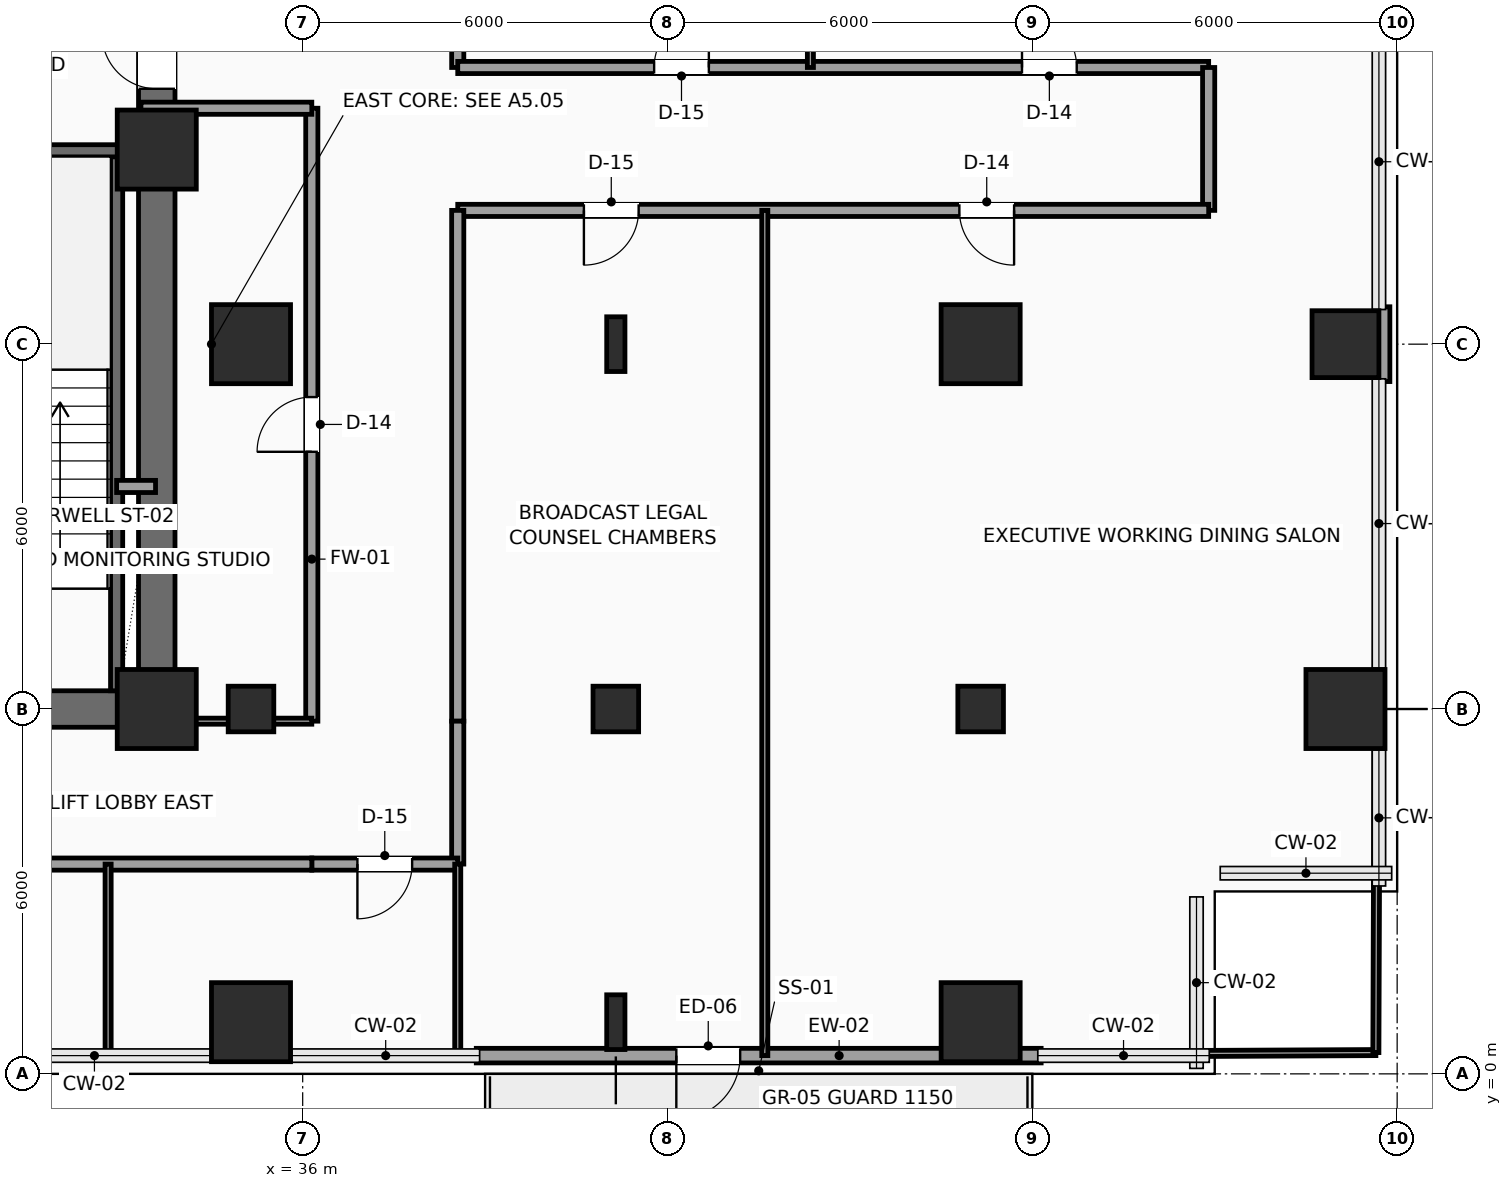
"""IFC4 building model, lengths in metres.
Left out: names, types, materials, properties, quantities, classifications, styles, units other than length and angle.
Written with IfcOpenShell. Run it as: python <this file> out.ifc"""

import sys

from ifc_helpers import new_model, si_unit, direction, frame, frame_2d, origin, origin_2d, place, context, subcontext, project, spatial, rectangle, hollow_rectangle, i_section, extrude, element, fill, save


model = new_model("IFC4")
c1 = context("Model", 3, precision=1e-05, world=origin(), true_north=direction((0.0, 1.0)))
c2 = subcontext(c1, "Body", "Model", "MODEL_VIEW")
j1 = project(units=[si_unit("LENGTHUNIT", "METRE"), si_unit("PLANEANGLEUNIT", "RADIAN")], contexts=[c1])
p1 = place(None, origin())
s1 = spatial("IfcSite", under=j1, at=p1, CompositionType="ELEMENT")
p2 = place(p1, origin())
s2 = spatial("IfcBuilding", under=s1, at=p2, CompositionType="ELEMENT")
p3 = place(p2, frame((0.0, 0.0, 87.0)))
s3 = spatial("IfcBuildingStorey", under=s2, at=p3, CompositionType="ELEMENT", Elevation=87.0)
for number, where, z_axis, x_axis in (
    (1, (33.6, 6.0, 0.0), (0.0, 0.0, 1.0), (1.0, 0.0, 0.0)),
    (2, (33.6, 15.2, 0.0), (0.0, 0.0, 1.0), (1.0, 0.0, 0.0)),
    (3, (35.15, 0.85, 0.0), (0.0, 0.0, 1.0), (1.0, 0.0, 0.0)),
):
    element("IfcColumn", number, at=place(p3, frame(where, z_axis=z_axis, x_axis=x_axis)), inside=s3, PredefinedType="COLUMN", context=c2, shape_type="SweptSolid", body=[
        extrude(rectangle(XDim=1.3, YDim=1.3, at=origin_2d()), origin(), (0.0, 0.0, 1.0), 3.9),
    ])
p4 = place(p3, frame((35.15, 6.0, 0.0), z_axis=(0.0, 0.0, 1.0), x_axis=(1.0, 0.0, 0.0)))
e4 = element("IfcColumn", 4, at=p4, inside=s3, PredefinedType="COLUMN", context=c2, shape_type="SweptSolid", body=[
    extrude(hollow_rectangle(XDim=0.75, YDim=0.75, WallThickness=0.035, InnerFilletRadius=0.035, OuterFilletRadius=0.05, at=origin_2d()), origin(), (0.0, 0.0, 1.0), 3.9),
])
p5 = place(p3, frame((35.15, 12.0, 0.0), z_axis=(0.0, 0.0, 1.0), x_axis=(1.0, 0.0, 0.0)))
e5 = element("IfcColumn", 5, at=p5, inside=s3, PredefinedType="COLUMN", context=c2, shape_type="SweptSolid", body=[
    extrude(rectangle(XDim=1.3, YDim=1.3, at=origin_2d()), origin(), (0.0, 0.0, 1.0), 3.9),
])
p6 = place(p3, frame((41.15, 0.85, 0.0), z_axis=(0.0, 0.0, 1.0), x_axis=(1.0, 0.0, 0.0)))
e6 = element("IfcColumn", 6, at=p6, inside=s3, PredefinedType="COLUMN", context=c2, shape_type="SweptSolid", body=[
    extrude(i_section(OverallWidth=0.3, OverallDepth=0.9, WebThickness=0.019, FlangeThickness=0.035, FilletRadius=0.03, at=origin_2d()), origin(), (0.0, 0.0, 1.0), 3.9),
])
p7 = place(p3, frame((41.15, 6.0, 0.0), z_axis=(0.0, 0.0, 1.0), x_axis=(1.0, 0.0, 0.0)))
e7 = element("IfcColumn", 7, at=p7, inside=s3, PredefinedType="COLUMN", context=c2, shape_type="SweptSolid", body=[
    extrude(hollow_rectangle(XDim=0.75, YDim=0.75, WallThickness=0.035, InnerFilletRadius=0.035, OuterFilletRadius=0.05, at=origin_2d()), origin(), (0.0, 0.0, 1.0), 3.9),
])
p8 = place(p3, frame((41.15, 12.0, 0.0), z_axis=(0.0, 0.0, 1.0), x_axis=(1.0, 0.0, 0.0)))
e8 = element("IfcColumn", 8, at=p8, inside=s3, PredefinedType="COLUMN", context=c2, shape_type="SweptSolid", body=[
    extrude(i_section(OverallWidth=0.3, OverallDepth=0.9, WebThickness=0.019, FlangeThickness=0.035, FilletRadius=0.03, at=origin_2d()), origin(), (0.0, 0.0, 1.0), 3.9),
])
p9 = place(p3, frame((47.15, 0.85, 0.0), z_axis=(0.0, 0.0, 1.0), x_axis=(1.0, 0.0, 0.0)))
e9 = element("IfcColumn", 9, at=p9, inside=s3, PredefinedType="COLUMN", context=c2, shape_type="SweptSolid", body=[
    extrude(rectangle(XDim=1.3, YDim=1.3, at=origin_2d()), origin(), (0.0, 0.0, 1.0), 3.9),
])
p10 = place(p3, frame((47.15, 6.0, 0.0), z_axis=(0.0, 0.0, 1.0), x_axis=(1.0, 0.0, 0.0)))
e10 = element("IfcColumn", 10, at=p10, inside=s3, PredefinedType="COLUMN", context=c2, shape_type="SweptSolid", body=[
    extrude(hollow_rectangle(XDim=0.75, YDim=0.75, WallThickness=0.035, InnerFilletRadius=0.035, OuterFilletRadius=0.05, at=origin_2d()), origin(), (0.0, 0.0, 1.0), 3.9),
])
for number, where, z_axis, x_axis in (
    (11, (47.15, 12.0, 0.0), (0.0, 0.0, 1.0), (1.0, 0.0, 0.0)),
    (12, (53.15, 6.0, 0.0), (0.0, 0.0, 1.0), (1.0, 0.0, 0.0)),
):
    element("IfcColumn", number, at=place(p3, frame(where, z_axis=z_axis, x_axis=x_axis)), inside=s3, PredefinedType="COLUMN", context=c2, shape_type="SweptSolid", body=[
        extrude(rectangle(XDim=1.3, YDim=1.3, at=origin_2d()), origin(), (0.0, 0.0, 1.0), 3.9),
    ])
p11 = place(p3, frame((53.15, 12.0, 0.0), z_axis=(0.0, 0.0, 1.0), x_axis=(1.0, 0.0, 0.0)))
e13 = element("IfcColumn", 13, at=p11, inside=s3, PredefinedType="COLUMN", context=c2, shape_type="SweptSolid", body=[
    extrude(rectangle(XDim=1.1, YDim=1.1, at=origin_2d()), origin(), (0.0, 0.0, 1.0), 3.9),
])
p12 = place(p3, frame((48.145, 0.3, 0.0), z_axis=(0.0, 0.0, 1.0), x_axis=(-1.0, 0.0, 0.0)))
e14 = element("IfcWall", 14, at=p12, inside=s3, PredefinedType="SOLIDWALL", context=c2, shape_type="SweptSolid", body=[
    extrude(rectangle(XDim=9.29, YDim=0.24, at=frame_2d((4.645, 0.0))), origin(), (0.0, 0.0, 1.0), 3.65),
])
p13 = place(p12, frame((4.95, 0.0, 0.0)))
e15 = element("IfcOpeningElement", 15, at=p13, cuts=e14, PredefinedType="OPENING", context=c2, shape_type="SweptSolid", body=[
    extrude(rectangle(XDim=1.05, YDim=2.2, at=frame_2d((0.525, 1.1))), frame((0.0, 0.13, 0.0), z_axis=(0.0, -1.0, 0.0), x_axis=(1.0, 0.0, 0.0)), (0.0, 0.0, 1.0), 0.26),
])
p14 = place(p3, frame((53.76, 12.615, 0.0), z_axis=(0.0, 0.0, 1.0), x_axis=(0.0, -1.0, 0.0)))
e16 = element("IfcWall", 16, at=p14, inside=s3, PredefinedType="SOLIDWALL", context=c2, shape_type="SweptSolid", body=[
    extrude(rectangle(XDim=1.23, YDim=0.24, at=frame_2d((0.615, 0.0))), origin(), (0.0, 0.0, 1.0), 3.65),
])
p15 = place(p3, frame((24.0, 6.0, 0.0), z_axis=(0.0, 0.0, 1.0), x_axis=(1.0, 0.0, 0.0)))
e17 = element("IfcWall", 17, at=p15, inside=s3, PredefinedType="SHEAR", context=c2, shape_type="SweptSolid", body=[
    extrude(rectangle(XDim=9.6, YDim=0.6, at=frame_2d((4.8, 0.0))), origin(), (0.0, 0.0, 1.0), 3.65),
])
p16 = place(p3, frame((33.6, 6.0, 0.0), z_axis=(0.0, 0.0, 1.0), x_axis=(0.0, 1.0, 0.0)))
e18 = element("IfcWall", 18, at=p16, inside=s3, PredefinedType="SHEAR", context=c2, shape_type="SweptSolid", body=[
    extrude(rectangle(XDim=12.0, YDim=0.6, at=frame_2d((6.0, 0.0))), origin(), (0.0, 0.0, 1.0), 3.65),
])
p17 = place(p16, frame((10.2, 0.0, 0.0)))
e19 = element("IfcOpeningElement", 19, at=p17, cuts=e18, PredefinedType="OPENING", context=c2, shape_type="SweptSolid", body=[
    extrude(rectangle(XDim=0.9, YDim=2.15, at=frame_2d((0.45, 1.075))), frame((0.0, 0.31, 0.0), z_axis=(0.0, -1.0, 0.0), x_axis=(1.0, 0.0, 0.0)), (0.0, 0.0, 1.0), 0.62),
])
p18 = place(p3, frame((32.94, 6.3, 0.0), z_axis=(0.0, 0.0, 1.0), x_axis=(0.0, 1.0, 0.0)))
e20 = element("IfcWall", 20, at=p18, inside=s3, PredefinedType="SHEAR", context=c2, shape_type="SweptSolid", body=[
    extrude(rectangle(XDim=8.88, YDim=0.2, at=frame_2d((4.44, 0.0))), origin(), (0.0, 0.0, 1.0), 3.65),
])
p19 = place(p3, frame((29.26, 15.18, 0.0), z_axis=(0.0, 0.0, 1.0), x_axis=(1.0, 0.0, 0.0)))
e21 = element("IfcWall", 21, at=p19, inside=s3, PredefinedType="SHEAR", context=c2, shape_type="SweptSolid", body=[
    extrude(rectangle(XDim=4.04, YDim=0.2, at=frame_2d((2.02, 0.0))), origin(), (0.0, 0.0, 1.0), 3.65),
])
p20 = place(p3, frame((32.94, 9.66, 0.0), z_axis=(0.0, 0.0, 1.0), x_axis=(1.0, 0.0, 0.0)))
e22 = element("IfcWall", 22, at=p20, inside=s3, PredefinedType="SOLIDWALL", context=c2, shape_type="SweptSolid", body=[
    extrude(rectangle(XDim=0.64, YDim=0.2, at=frame_2d((0.32, 0.0))), origin(), (0.0, 0.0, 1.0), 3.65),
])
p21 = place(p3, frame((36.15, 5.8, 0.0), z_axis=(0.0, 0.0, 1.0), x_axis=(0.0, 1.0, 0.0)))
e23 = element("IfcWall", 23, at=p21, inside=s3, PredefinedType="SOLIDWALL", context=c2, shape_type="SweptSolid", body=[
    extrude(rectangle(XDim=10.08, YDim=0.2, at=frame_2d((5.04, 0.0))), origin(), (0.0, 0.0, 1.0), 3.65),
])
p22 = place(p21, frame((4.43, 0.0, 0.0)))
e24 = element("IfcOpeningElement", 24, at=p22, cuts=e23, PredefinedType="OPENING", context=c2, shape_type="SweptSolid", body=[
    extrude(rectangle(XDim=0.9, YDim=2.1, at=frame_2d((0.45, 1.05))), frame((0.0, 0.11, 0.0), z_axis=(0.0, -1.0, 0.0), x_axis=(1.0, 0.0, 0.0)), (0.0, 0.0, 1.0), 0.22),
])
p23 = place(p3, frame((36.15, 15.88, 0.0), z_axis=(0.0, 0.0, 1.0), x_axis=(-1.0, 0.0, 0.0)))
e25 = element("IfcWall", 25, at=p23, inside=s3, PredefinedType="SOLIDWALL", context=c2, shape_type="SweptSolid", body=[
    extrude(rectangle(XDim=2.81, YDim=0.2, at=frame_2d((1.405, 0.0))), origin(), (0.0, 0.0, 1.0), 3.65),
])
p24 = place(p3, frame((38.55, 23.7, 0.0), z_axis=(0.0, 0.0, 1.0), x_axis=(0.0, -1.0, 0.0)))
e26 = element("IfcWall", 26, at=p24, inside=s3, PredefinedType="SOLIDWALL", context=c2, shape_type="SweptSolid", body=[
    extrude(rectangle(XDim=7.15, YDim=0.2, at=frame_2d((3.575, 0.0))), origin(), (0.0, 0.0, 1.0), 3.65),
])
p25 = place(p3, frame((38.55, 16.55, 0.0), z_axis=(0.0, 0.0, 1.0), x_axis=(1.0, 0.0, 0.0)))
e27 = element("IfcWall", 27, at=p25, inside=s3, PredefinedType="SOLIDWALL", context=c2, shape_type="SweptSolid", body=[
    extrude(rectangle(XDim=12.35, YDim=0.2, at=frame_2d((6.175, 0.0))), origin(), (0.0, 0.0, 1.0), 3.65),
])
p26 = place(p25, frame((3.23, 0.0, 0.0)))
e28 = element("IfcOpeningElement", 28, at=p26, cuts=e27, PredefinedType="OPENING", context=c2, shape_type="SweptSolid", body=[
    extrude(rectangle(XDim=0.9, YDim=2.1, at=frame_2d((0.45, 1.05))), frame((0.0, 0.11, 0.0), z_axis=(0.0, -1.0, 0.0), x_axis=(1.0, 0.0, 0.0)), (0.0, 0.0, 1.0), 0.22),
])
p27 = place(p25, frame((9.28, 0.0, 0.0)))
e29 = element("IfcOpeningElement", 29, at=p27, cuts=e27, PredefinedType="OPENING", context=c2, shape_type="SweptSolid", body=[
    extrude(rectangle(XDim=0.9, YDim=2.1, at=frame_2d((0.45, 1.05))), frame((0.0, 0.11, 0.0), z_axis=(0.0, -1.0, 0.0), x_axis=(1.0, 0.0, 0.0)), (0.0, 0.0, 1.0), 0.22),
])
p28 = place(p3, frame((50.9, 16.55, 0.0), z_axis=(0.0, 0.0, 1.0), x_axis=(0.0, -1.0, 0.0)))
e30 = element("IfcWall", 30, at=p28, inside=s3, PredefinedType="SOLIDWALL", context=c2, shape_type="SweptSolid", body=[
    extrude(rectangle(XDim=2.35, YDim=0.2, at=frame_2d((1.175, 0.0))), origin(), (0.0, 0.0, 1.0), 3.65),
])
p29 = place(p3, frame((50.9, 14.2, 0.0), z_axis=(0.0, 0.0, 1.0), x_axis=(-1.0, 0.0, 0.0)))
e31 = element("IfcWall", 31, at=p29, inside=s3, PredefinedType="SOLIDWALL", context=c2, shape_type="SweptSolid", body=[
    extrude(rectangle(XDim=12.35, YDim=0.2, at=frame_2d((6.175, 0.0))), origin(), (0.0, 0.0, 1.0), 3.65),
])
p30 = place(p29, frame((9.375, 0.0, 0.0)))
e32 = element("IfcOpeningElement", 32, at=p30, cuts=e31, PredefinedType="OPENING", context=c2, shape_type="SweptSolid", body=[
    extrude(rectangle(XDim=0.9, YDim=2.1, at=frame_2d((0.45, 1.05))), frame((0.0, 0.11, 0.0), z_axis=(0.0, -1.0, 0.0), x_axis=(1.0, 0.0, 0.0)), (0.0, 0.0, 1.0), 0.22),
])
p31 = place(p29, frame((3.2, 0.0, 0.0)))
e33 = element("IfcOpeningElement", 33, at=p31, cuts=e31, PredefinedType="OPENING", context=c2, shape_type="SweptSolid", body=[
    extrude(rectangle(XDim=0.9, YDim=2.1, at=frame_2d((0.45, 1.05))), frame((0.0, 0.11, 0.0), z_axis=(0.0, -1.0, 0.0), x_axis=(1.0, 0.0, 0.0)), (0.0, 0.0, 1.0), 0.22),
])
p32 = place(p3, frame((38.55, 14.2, 0.0), z_axis=(0.0, 0.0, 1.0), x_axis=(0.0, -1.0, 0.0)))
e34 = element("IfcWall", 34, at=p32, inside=s3, PredefinedType="SOLIDWALL", context=c2, shape_type="SweptSolid", body=[
    extrude(rectangle(XDim=8.4, YDim=0.2, at=frame_2d((4.2, 0.0))), origin(), (0.0, 0.0, 1.0), 3.65),
])
p33 = place(p3, frame((38.55, 5.8, 0.0), z_axis=(0.0, 0.0, 1.0), x_axis=(0.0, -1.0, 0.0)))
e35 = element("IfcWall", 35, at=p33, inside=s3, PredefinedType="SOLIDWALL", context=c2, shape_type="SweptSolid", body=[
    extrude(rectangle(XDim=2.35, YDim=0.2, at=frame_2d((1.175, 0.0))), origin(), (0.0, 0.0, 1.0), 3.65),
])
p34 = place(p3, frame((38.55, 3.45, 0.0), z_axis=(0.0, 0.0, 1.0), x_axis=(-1.0, 0.0, 0.0)))
e36 = element("IfcWall", 36, at=p34, inside=s3, PredefinedType="SOLIDWALL", context=c2, shape_type="SweptSolid", body=[
    extrude(rectangle(XDim=2.4, YDim=0.2, at=frame_2d((1.2, 0.0))), origin(), (0.0, 0.0, 1.0), 3.142),
])
p35 = place(p34, frame((0.75, 0.0, 0.0)))
e37 = element("IfcOpeningElement", 37, at=p35, cuts=e36, PredefinedType="OPENING", context=c2, shape_type="SweptSolid", body=[
    extrude(rectangle(XDim=0.9, YDim=2.1, at=frame_2d((0.45, 1.05))), frame((0.0, 0.11, 0.0), z_axis=(0.0, -1.0, 0.0), x_axis=(1.0, 0.0, 0.0)), (0.0, 0.0, 1.0), 0.22),
])
p36 = place(p3, frame((36.15, 3.45, 0.0), z_axis=(0.0, 0.0, 1.0), x_axis=(-1.0, 0.0, 0.0)))
e38 = element("IfcWall", 38, at=p36, inside=s3, PredefinedType="SOLIDWALL", context=c2, shape_type="SweptSolid", body=[
    extrude(rectangle(XDim=14.6, YDim=0.2, at=frame_2d((7.3, 0.0))), origin(), (0.0, 0.0, 1.0), 3.142),
])
p37 = place(p36, frame((11.325, 0.0, 0.0)))
e39 = element("IfcOpeningElement", 39, at=p37, cuts=e38, PredefinedType="OPENING", context=c2, shape_type="SweptSolid", body=[
    extrude(rectangle(XDim=0.9, YDim=2.1, at=frame_2d((0.45, 1.05))), frame((0.0, 0.11, 0.0), z_axis=(0.0, -1.0, 0.0), x_axis=(1.0, 0.0, 0.0)), (0.0, 0.0, 1.0), 0.22),
])
p38 = place(p36, frame((5.7, 0.0, 0.0)))
e40 = element("IfcOpeningElement", 40, at=p38, cuts=e38, PredefinedType="OPENING", context=c2, shape_type="SweptSolid", body=[
    extrude(rectangle(XDim=0.9, YDim=2.1, at=frame_2d((0.45, 1.05))), frame((0.0, 0.11, 0.0), z_axis=(0.0, -1.0, 0.0), x_axis=(1.0, 0.0, 0.0)), (0.0, 0.0, 1.0), 0.22),
])
p39 = place(p3, frame((43.6, 0.3, 0.0), z_axis=(0.0, 0.0, 1.0), x_axis=(0.0, 1.0, 0.0)))
e41 = element("IfcWall", 41, at=p39, inside=s3, PredefinedType="PARTITIONING", context=c2, shape_type="SweptSolid", body=[
    extrude(rectangle(XDim=13.9, YDim=0.1, at=frame_2d((6.95, 0.0))), origin(), (0.0, 0.0, 1.0), 3.65),
])
p40 = place(p3, frame((48.145, 0.323, 0.0), z_axis=(0.0, 0.0, 1.0), x_axis=(0.999987442515, 0.005011468024, 0.0)))
e42 = element("IfcWall", 42, at=p40, inside=s3, PredefinedType="PARTITIONING", context=c2, shape_type="SweptSolid", body=[
    extrude(rectangle(XDim=5.505, YDim=0.1, at=frame_2d((2.752, 0.0))), origin(), (0.0, 0.0, 1.0), 3.65),
])
p41 = place(p3, frame((53.65, 0.35, 0.0), z_axis=(0.0, 0.0, 1.0), x_axis=(0.003606251025, 0.999993497456, 0.0)))
e43 = element("IfcWall", 43, at=p41, inside=s3, PredefinedType="PARTITIONING", context=c2, shape_type="SweptSolid", body=[
    extrude(rectangle(XDim=11.035, YDim=0.1, at=frame_2d((5.518, 0.0))), origin(), (0.0, 0.0, 1.0), 3.65),
])
p42 = place(p3, frame((53.694, 12.615, 0.0), z_axis=(0.0, 0.0, 1.0), x_axis=(0.003542799701, 0.999993724265, 0.0)))
e44 = element("IfcWall", 44, at=p42, inside=s3, PredefinedType="PARTITIONING", context=c2, shape_type="SweptSolid", body=[
    extrude(rectangle(XDim=1.585, YDim=0.1, at=frame_2d((0.792, 0.0))), origin(), (0.0, 0.0, 1.0), 3.65),
])
p43 = place(p3, frame((44.35, 16.55, 0.0), z_axis=(0.0, 0.0, 1.0), x_axis=(0.0, 1.0, 0.0)))
e45 = element("IfcWall", 45, at=p43, inside=s3, PredefinedType="PARTITIONING", context=c2, shape_type="SweptSolid", body=[
    extrude(rectangle(XDim=7.15, YDim=0.1, at=frame_2d((3.575, 0.0))), origin(), (0.0, 0.0, 1.0), 3.65),
])
p44 = place(p3, frame((53.7, 16.55, 0.0), z_axis=(0.0, 0.0, 1.0), x_axis=(-0.007017371073, 0.999975377948, 0.0)))
e46 = element("IfcWall", 46, at=p44, inside=s3, PredefinedType="PARTITIONING", context=c2, shape_type="SweptSolid", body=[
    extrude(rectangle(XDim=0.835, YDim=0.1, at=frame_2d((0.417, 0.0))), origin(), (0.0, 0.0, 1.0), 3.65),
])
for number, where, z_axis, x_axis in (
    (47, (32.8, 0.3, 0.0), (0.0, 0.0, 1.0), (0.0, 1.0, 0.0)),
    (48, (38.55, 0.3, 0.0), (0.0, 0.0, 1.0), (0.0, 1.0, 0.0)),
):
    element("IfcWall", number, at=place(p3, frame(where, z_axis=z_axis, x_axis=x_axis)), inside=s3, PredefinedType="PARTITIONING", context=c2, shape_type="SweptSolid", body=[
        extrude(rectangle(XDim=3.15, YDim=0.1, at=frame_2d((1.575, 0.0))), origin(), (0.0, 0.0, 1.0), 3.65),
    ])
p45 = place(p3, frame((33.65, 5.8, 0.0), z_axis=(0.0, 0.0, 1.0), x_axis=(1.0, 0.0, 0.0)))
e49 = element("IfcWall", 49, at=p45, inside=s3, PredefinedType="PARTITIONING", context=c2, shape_type="SweptSolid", body=[
    extrude(rectangle(XDim=2.5, YDim=0.1, at=frame_2d((1.25, 0.0))), origin(), (0.0, 0.0, 1.0), 2.992),
])
p46 = place(p13, origin())
e50 = element("IfcDoor", 50, at=p46, inside=s3, OperationType="SINGLE_SWING_RIGHT", PredefinedType="DOOR", context=c2, shape_type="SweptSolid", body=[
    extrude(rectangle(XDim=1.05, YDim=2.2, at=frame_2d((0.525, 1.1))), frame((0.0, 0.025, 0.0), z_axis=(0.0, -1.0, 0.0), x_axis=(1.0, 0.0, 0.0)), (0.0, 0.0, 1.0), 0.05),
])
fill(e15, e50)
p47 = place(p17, origin())
e51 = element("IfcDoor", 51, at=p47, inside=s3, OperationType="SINGLE_SWING_RIGHT", PredefinedType="DOOR", context=c2, shape_type="SweptSolid", body=[
    extrude(rectangle(XDim=0.9, YDim=2.15, at=frame_2d((0.45, 1.075))), frame((0.0, 0.025, 0.0), z_axis=(0.0, -1.0, 0.0), x_axis=(1.0, 0.0, 0.0)), (0.0, 0.0, 1.0), 0.05),
])
fill(e19, e51)
p48 = place(p22, origin())
e52 = element("IfcDoor", 52, at=p48, inside=s3, OperationType="SINGLE_SWING_LEFT", PredefinedType="DOOR", context=c2, shape_type="SweptSolid", body=[
    extrude(rectangle(XDim=0.9, YDim=2.1, at=frame_2d((0.45, 1.05))), frame((0.0, 0.025, 0.0), z_axis=(0.0, -1.0, 0.0), x_axis=(1.0, 0.0, 0.0)), (0.0, 0.0, 1.0), 0.05),
])
fill(e24, e52)
p49 = place(p26, origin())
e53 = element("IfcDoor", 53, at=p49, inside=s3, OperationType="SINGLE_SWING_RIGHT", PredefinedType="DOOR", context=c2, shape_type="SweptSolid", body=[
    extrude(rectangle(XDim=0.9, YDim=2.1, at=frame_2d((0.45, 1.05))), frame((0.0, 0.025, 0.0), z_axis=(0.0, -1.0, 0.0), x_axis=(1.0, 0.0, 0.0)), (0.0, 0.0, 1.0), 0.05),
])
fill(e28, e53)
p50 = place(p27, origin())
e54 = element("IfcDoor", 54, at=p50, inside=s3, OperationType="SINGLE_SWING_LEFT", PredefinedType="DOOR", context=c2, shape_type="SweptSolid", body=[
    extrude(rectangle(XDim=0.9, YDim=2.1, at=frame_2d((0.45, 1.05))), frame((0.0, 0.025, 0.0), z_axis=(0.0, -1.0, 0.0), x_axis=(1.0, 0.0, 0.0)), (0.0, 0.0, 1.0), 0.05),
])
fill(e29, e54)
p51 = place(p30, origin())
e55 = element("IfcDoor", 55, at=p51, inside=s3, OperationType="SINGLE_SWING_RIGHT", PredefinedType="DOOR", context=c2, shape_type="SweptSolid", body=[
    extrude(rectangle(XDim=0.9, YDim=2.1, at=frame_2d((0.45, 1.05))), frame((0.0, 0.025, 0.0), z_axis=(0.0, -1.0, 0.0), x_axis=(1.0, 0.0, 0.0)), (0.0, 0.0, 1.0), 0.05),
])
fill(e32, e55)
p52 = place(p31, origin())
e56 = element("IfcDoor", 56, at=p52, inside=s3, OperationType="SINGLE_SWING_LEFT", PredefinedType="DOOR", context=c2, shape_type="SweptSolid", body=[
    extrude(rectangle(XDim=0.9, YDim=2.1, at=frame_2d((0.45, 1.05))), frame((0.0, 0.025, 0.0), z_axis=(0.0, -1.0, 0.0), x_axis=(1.0, 0.0, 0.0)), (0.0, 0.0, 1.0), 0.05),
])
fill(e33, e56)
p53 = place(p35, origin())
e57 = element("IfcDoor", 57, at=p53, inside=s3, OperationType="SINGLE_SWING_RIGHT", PredefinedType="DOOR", context=c2, shape_type="SweptSolid", body=[
    extrude(rectangle(XDim=0.9, YDim=2.1, at=frame_2d((0.45, 1.05))), frame((0.0, 0.025, 0.0), z_axis=(0.0, -1.0, 0.0), x_axis=(1.0, 0.0, 0.0)), (0.0, 0.0, 1.0), 0.05),
])
fill(e37, e57)
save(model, sys.argv[1])
